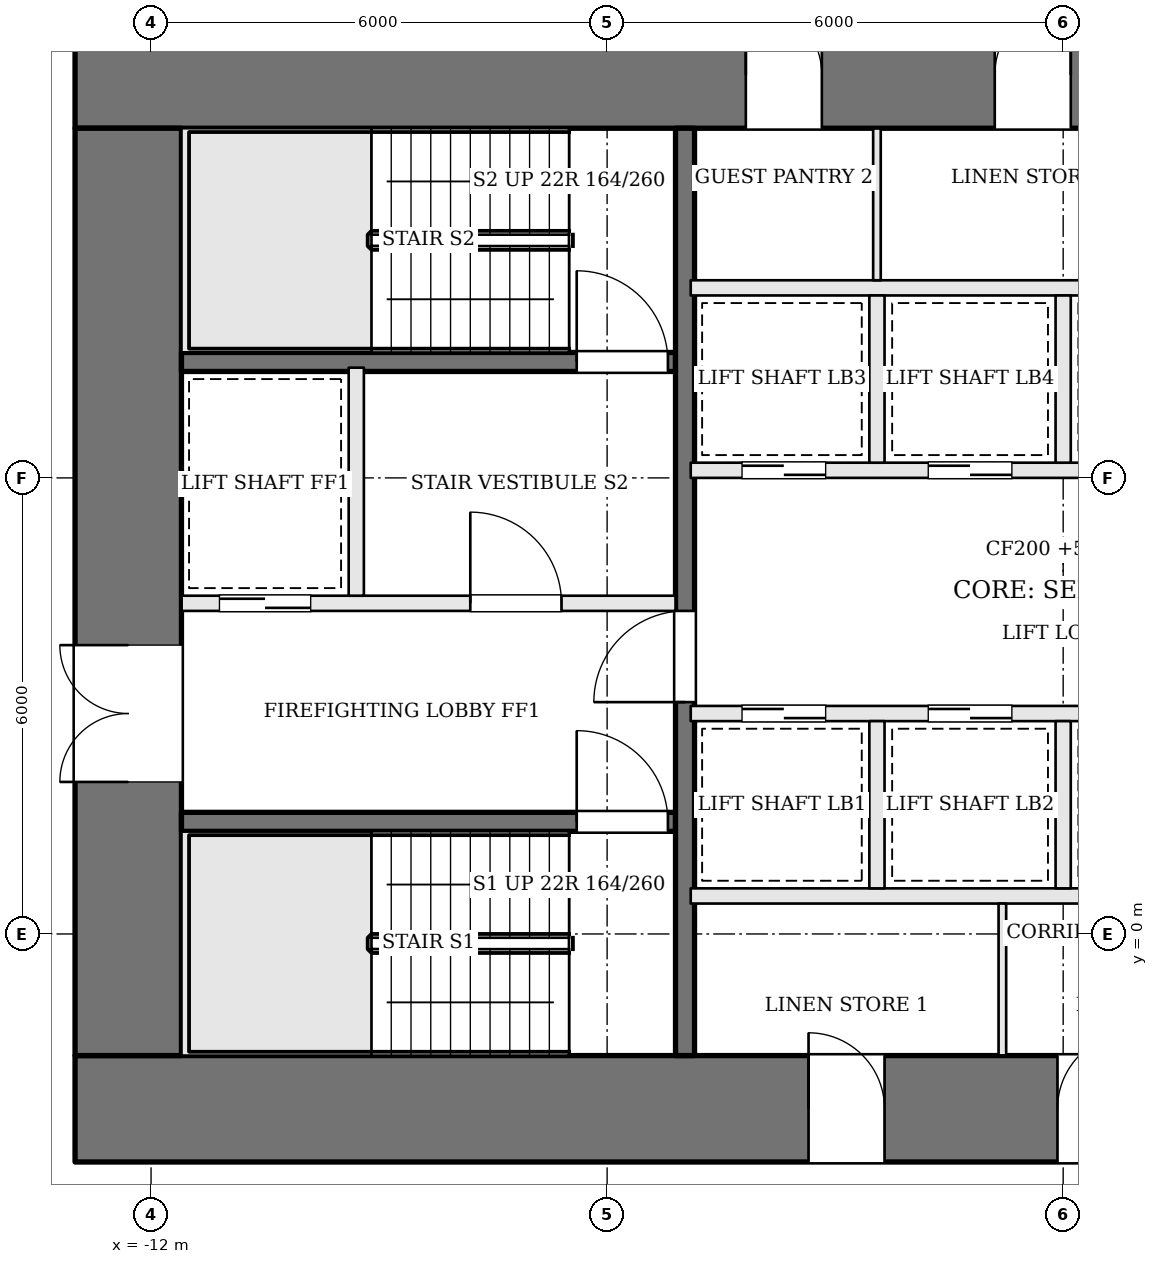
"""IFC4 building model, lengths in metres.
Left out: names, types, materials, properties, quantities, classifications, styles, units other than length and angle.
Written with IfcOpenShell. Run it as: python <this file> out.ifc"""

import sys

from ifc_helpers import new_model, si_unit, direction, frame, frame_2d, origin, place, context, subcontext, project, spatial, rectangle, extrude, element, fill, save


model = new_model("IFC4")
c1 = context("Model", 3, precision=1e-05, world=origin(), true_north=direction((0.0, 1.0)))
c2 = subcontext(c1, "Body", "Model", "MODEL_VIEW")
j1 = project(units=[si_unit("LENGTHUNIT", "METRE"), si_unit("PLANEANGLEUNIT", "RADIAN")], contexts=[c1])
p1 = place(None, origin())
s1 = spatial("IfcSite", under=j1, at=p1, CompositionType="ELEMENT")
p2 = place(p1, origin())
s2 = spatial("IfcBuilding", under=s1, at=p2, CompositionType="ELEMENT")
p3 = place(p2, frame((0.0, 0.0, 59.1)))
s3 = spatial("IfcBuildingStorey", under=s2, at=p3, CompositionType="ELEMENT", Elevation=59.1)
p4 = place(p3, frame((-13.0, 11.3, 0.0), z_axis=(0.0, 0.0, 1.0), x_axis=(1.0, 0.0, 0.0)))
e1 = element("IfcWall", 1, at=p4, inside=s3, PredefinedType="SHEAR", context=c2, shape_type="SweptSolid", body=[
    extrude(rectangle(XDim=26.0, YDim=1.4, at=frame_2d((13.0, 0.0))), origin(), (0.0, 0.0, 1.0), 3.6),
])
p5 = place(p4, frame((8.825, 0.0, 0.0)))
e2 = element("IfcOpeningElement", 2, at=p5, cuts=e1, PredefinedType="OPENING", context=c2, shape_type="SweptSolid", body=[
    extrude(rectangle(XDim=1.0, YDim=2.1, at=frame_2d((0.5, 1.05))), frame((0.0, 0.71, 0.0), z_axis=(0.0, -1.0, 0.0), x_axis=(1.0, 0.0, 0.0)), (0.0, 0.0, 1.0), 1.42),
])
p6 = place(p4, frame((12.1, 0.0, 0.0)))
e3 = element("IfcOpeningElement", 3, at=p6, cuts=e1, PredefinedType="OPENING", context=c2, shape_type="SweptSolid", body=[
    extrude(rectangle(XDim=1.0, YDim=2.1, at=frame_2d((0.5, 1.05))), frame((0.0, 0.71, 0.0), z_axis=(0.0, -1.0, 0.0), x_axis=(1.0, 0.0, 0.0)), (0.0, 0.0, 1.0), 1.42),
])
p7 = place(p4, frame((15.125, 0.0, 0.0)))
e4 = element("IfcOpeningElement", 4, at=p7, cuts=e1, PredefinedType="OPENING", context=c2, shape_type="SweptSolid", body=[
    extrude(rectangle(XDim=0.7, YDim=2.1, at=frame_2d((0.35, 1.05))), frame((0.0, 0.71, 0.0), z_axis=(0.0, -1.0, 0.0), x_axis=(1.0, 0.0, 0.0)), (0.0, 0.0, 1.0), 1.42),
])
p8 = place(p4, frame((16.65, 0.0, 0.0)))
e5 = element("IfcOpeningElement", 5, at=p8, cuts=e1, PredefinedType="OPENING", context=c2, shape_type="SweptSolid", body=[
    extrude(rectangle(XDim=0.9, YDim=2.1, at=frame_2d((0.45, 1.05))), frame((0.0, 0.71, 0.0), z_axis=(0.0, -1.0, 0.0), x_axis=(1.0, 0.0, 0.0)), (0.0, 0.0, 1.0), 1.42),
])
p9 = place(p3, frame((-13.0, -2.3, 0.0), z_axis=(0.0, 0.0, 1.0), x_axis=(1.0, 0.0, 0.0)))
e6 = element("IfcWall", 6, at=p9, inside=s3, PredefinedType="SHEAR", context=c2, shape_type="SweptSolid", body=[
    extrude(rectangle(XDim=26.0, YDim=1.4, at=frame_2d((13.0, 0.0))), origin(), (0.0, 0.0, 1.0), 3.6),
])
p10 = place(p9, frame((9.65, 0.0, 0.0)))
e7 = element("IfcOpeningElement", 7, at=p10, cuts=e6, PredefinedType="OPENING", context=c2, shape_type="SweptSolid", body=[
    extrude(rectangle(XDim=1.0, YDim=2.1, at=frame_2d((0.5, 1.05))), frame((0.0, 0.71, 0.0), z_axis=(0.0, -1.0, 0.0), x_axis=(1.0, 0.0, 0.0)), (0.0, 0.0, 1.0), 1.42),
])
p11 = place(p9, frame((12.925, 0.0, 0.0)))
e8 = element("IfcOpeningElement", 8, at=p11, cuts=e6, PredefinedType="OPENING", context=c2, shape_type="SweptSolid", body=[
    extrude(rectangle(XDim=1.0, YDim=2.1, at=frame_2d((0.5, 1.05))), frame((0.0, 0.71, 0.0), z_axis=(0.0, -1.0, 0.0), x_axis=(1.0, 0.0, 0.0)), (0.0, 0.0, 1.0), 1.42),
])
p12 = place(p9, frame((15.125, 0.0, 0.0)))
e9 = element("IfcOpeningElement", 9, at=p12, cuts=e6, PredefinedType="OPENING", context=c2, shape_type="SweptSolid", body=[
    extrude(rectangle(XDim=0.7, YDim=2.1, at=frame_2d((0.35, 1.05))), frame((0.0, 0.71, 0.0), z_axis=(0.0, -1.0, 0.0), x_axis=(1.0, 0.0, 0.0)), (0.0, 0.0, 1.0), 1.42),
])
p13 = place(p9, frame((16.5, 0.0, 0.0)))
e10 = element("IfcOpeningElement", 10, at=p13, cuts=e6, PredefinedType="OPENING", context=c2, shape_type="SweptSolid", body=[
    extrude(rectangle(XDim=1.0, YDim=2.1, at=frame_2d((0.5, 1.05))), frame((0.0, 0.71, 0.0), z_axis=(0.0, -1.0, 0.0), x_axis=(1.0, 0.0, 0.0)), (0.0, 0.0, 1.0), 1.42),
])
p14 = place(p3, frame((-12.3, -1.6, 0.0), z_axis=(0.0, 0.0, 1.0), x_axis=(0.0, 1.0, 0.0)))
e11 = element("IfcWall", 11, at=p14, inside=s3, PredefinedType="SHEAR", context=c2, shape_type="SweptSolid", body=[
    extrude(rectangle(XDim=12.2, YDim=1.4, at=frame_2d((6.1, 0.0))), origin(), (0.0, 0.0, 1.0), 3.6),
])
p15 = place(p14, frame((3.6, 0.0, 0.0)))
e12 = element("IfcOpeningElement", 12, at=p15, cuts=e11, PredefinedType="OPENING", context=c2, shape_type="SweptSolid", body=[
    extrude(rectangle(XDim=1.8, YDim=2.1, at=frame_2d((0.9, 1.05))), frame((0.0, 0.71, 0.0), z_axis=(0.0, -1.0, 0.0), x_axis=(1.0, 0.0, 0.0)), (0.0, 0.0, 1.0), 1.42),
])
p16 = place(p3, frame((-11.6, 1.475, 0.0), z_axis=(0.0, 0.0, 1.0), x_axis=(1.0, 0.0, 0.0)))
e13 = element("IfcWall", 13, at=p16, inside=s3, PredefinedType="SOLIDWALL", context=c2, shape_type="SweptSolid", body=[
    extrude(rectangle(XDim=6.5, YDim=0.25, at=frame_2d((3.25, 0.0))), origin(), (0.0, 0.0, 1.0), 3.4),
])
p17 = place(p16, frame((5.2, 0.0, 0.0)))
e14 = element("IfcOpeningElement", 14, at=p17, cuts=e13, PredefinedType="OPENING", context=c2, shape_type="SweptSolid", body=[
    extrude(rectangle(XDim=1.2, YDim=2.1, at=frame_2d((0.6, 1.05))), frame((0.0, 0.135, 0.0), z_axis=(0.0, -1.0, 0.0), x_axis=(1.0, 0.0, 0.0)), (0.0, 0.0, 1.0), 0.27),
])
p18 = place(p3, frame((-11.6, 4.35, 0.0), z_axis=(0.0, 0.0, 1.0), x_axis=(1.0, 0.0, 0.0)))
e15 = element("IfcWall", 15, at=p18, inside=s3, PredefinedType="SOLIDWALL", context=c2, shape_type="SweptSolid", body=[
    extrude(rectangle(XDim=6.5, YDim=0.2, at=frame_2d((3.25, 0.0))), origin(), (0.0, 0.0, 1.0), 3.4),
])
p19 = place(p18, frame((3.8, 0.0, 0.0)))
e16 = element("IfcOpeningElement", 16, at=p19, cuts=e15, PredefinedType="OPENING", context=c2, shape_type="SweptSolid", body=[
    extrude(rectangle(XDim=1.2, YDim=2.1, at=frame_2d((0.6, 1.05))), frame((0.0, 0.11, 0.0), z_axis=(0.0, -1.0, 0.0), x_axis=(1.0, 0.0, 0.0)), (0.0, 0.0, 1.0), 0.22),
])
p20 = place(p18, frame((0.5, 0.0, 0.0)))
e17 = element("IfcOpeningElement", 17, at=p20, cuts=e15, PredefinedType="OPENING", context=c2, shape_type="SweptSolid", body=[
    extrude(rectangle(XDim=1.2, YDim=2.1, at=frame_2d((0.6, 1.05))), frame((0.0, 0.11, 0.0), z_axis=(0.0, -1.0, 0.0), x_axis=(1.0, 0.0, 0.0)), (0.0, 0.0, 1.0), 0.22),
])
p21 = place(p3, frame((-11.6, 7.525, 0.0), z_axis=(0.0, 0.0, 1.0), x_axis=(1.0, 0.0, 0.0)))
e18 = element("IfcWall", 18, at=p21, inside=s3, PredefinedType="SOLIDWALL", context=c2, shape_type="SweptSolid", body=[
    extrude(rectangle(XDim=6.5, YDim=0.25, at=frame_2d((3.25, 0.0))), origin(), (0.0, 0.0, 1.0), 3.4),
])
p22 = place(p21, frame((5.2, 0.0, 0.0)))
e19 = element("IfcOpeningElement", 19, at=p22, cuts=e18, PredefinedType="OPENING", context=c2, shape_type="SweptSolid", body=[
    extrude(rectangle(XDim=1.2, YDim=2.1, at=frame_2d((0.6, 1.05))), frame((0.0, 0.135, 0.0), z_axis=(0.0, -1.0, 0.0), x_axis=(1.0, 0.0, 0.0)), (0.0, 0.0, 1.0), 0.27),
])
p23 = place(p3, frame((-9.3, 4.45, 0.0), z_axis=(0.0, 0.0, 1.0), x_axis=(0.0, 1.0, 0.0)))
e20 = element("IfcWall", 20, at=p23, inside=s3, PredefinedType="SOLIDWALL", context=c2, shape_type="SweptSolid", body=[
    extrude(rectangle(XDim=3.0, YDim=0.2, at=frame_2d((1.5, 0.0))), origin(), (0.0, 0.0, 1.0), 3.4),
])
p24 = place(p3, frame((-4.975, -1.6, 0.0), z_axis=(0.0, 0.0, 1.0), x_axis=(0.0, 1.0, 0.0)))
e21 = element("IfcWall", 21, at=p24, inside=s3, PredefinedType="SOLIDWALL", context=c2, shape_type="SweptSolid", body=[
    extrude(rectangle(XDim=12.2, YDim=0.25, at=frame_2d((6.1, 0.0))), origin(), (0.0, 0.0, 1.0), 3.4),
])
p25 = place(p24, frame((4.65, 0.0, 0.0)))
e22 = element("IfcOpeningElement", 22, at=p25, cuts=e21, PredefinedType="OPENING", context=c2, shape_type="SweptSolid", body=[
    extrude(rectangle(XDim=1.2, YDim=2.1, at=frame_2d((0.6, 1.05))), frame((0.0, 0.135, 0.0), z_axis=(0.0, -1.0, 0.0), x_axis=(1.0, 0.0, 0.0)), (0.0, 0.0, 1.0), 0.27),
])
p26 = place(p3, frame((-4.9, 0.5, 0.0), z_axis=(0.0, 0.0, 1.0), x_axis=(1.0, 0.0, 0.0)))
e23 = element("IfcWall", 23, at=p26, inside=s3, PredefinedType="SOLIDWALL", context=c2, shape_type="SweptSolid", body=[
    extrude(rectangle(XDim=9.8, YDim=0.2, at=frame_2d((4.9, 0.0))), origin(), (0.0, 0.0, 1.0), 3.4),
])
p27 = place(p3, frame((-4.9, 2.9, 0.0), z_axis=(0.0, 0.0, 1.0), x_axis=(1.0, 0.0, 0.0)))
e24 = element("IfcWall", 24, at=p27, inside=s3, PredefinedType="SOLIDWALL", context=c2, shape_type="SweptSolid", body=[
    extrude(rectangle(XDim=9.8, YDim=0.2, at=frame_2d((4.9, 0.0))), origin(), (0.0, 0.0, 1.0), 3.4),
])
p28 = place(p27, frame((0.675, 0.0, 0.0)))
e25 = element("IfcOpeningElement", 25, at=p28, cuts=e24, PredefinedType="OPENING", context=c2, shape_type="SweptSolid", body=[
    extrude(rectangle(XDim=1.1, YDim=2.1, at=frame_2d((0.55, 1.05))), frame((0.0, 0.11, 0.0), z_axis=(0.0, -1.0, 0.0), x_axis=(1.0, 0.0, 0.0)), (0.0, 0.0, 1.0), 0.22),
])
p29 = place(p27, frame((3.125, 0.0, 0.0)))
e26 = element("IfcOpeningElement", 26, at=p29, cuts=e24, PredefinedType="OPENING", context=c2, shape_type="SweptSolid", body=[
    extrude(rectangle(XDim=1.1, YDim=2.1, at=frame_2d((0.55, 1.05))), frame((0.0, 0.11, 0.0), z_axis=(0.0, -1.0, 0.0), x_axis=(1.0, 0.0, 0.0)), (0.0, 0.0, 1.0), 0.22),
])
p30 = place(p3, frame((-4.9, 6.1, 0.0), z_axis=(0.0, 0.0, 1.0), x_axis=(1.0, 0.0, 0.0)))
e27 = element("IfcWall", 27, at=p30, inside=s3, PredefinedType="SOLIDWALL", context=c2, shape_type="SweptSolid", body=[
    extrude(rectangle(XDim=9.8, YDim=0.2, at=frame_2d((4.9, 0.0))), origin(), (0.0, 0.0, 1.0), 3.4),
])
p31 = place(p30, frame((0.675, 0.0, 0.0)))
e28 = element("IfcOpeningElement", 28, at=p31, cuts=e27, PredefinedType="OPENING", context=c2, shape_type="SweptSolid", body=[
    extrude(rectangle(XDim=1.1, YDim=2.1, at=frame_2d((0.55, 1.05))), frame((0.0, 0.11, 0.0), z_axis=(0.0, -1.0, 0.0), x_axis=(1.0, 0.0, 0.0)), (0.0, 0.0, 1.0), 0.22),
])
p32 = place(p30, frame((3.125, 0.0, 0.0)))
e29 = element("IfcOpeningElement", 29, at=p32, cuts=e27, PredefinedType="OPENING", context=c2, shape_type="SweptSolid", body=[
    extrude(rectangle(XDim=1.1, YDim=2.1, at=frame_2d((0.55, 1.05))), frame((0.0, 0.11, 0.0), z_axis=(0.0, -1.0, 0.0), x_axis=(1.0, 0.0, 0.0)), (0.0, 0.0, 1.0), 0.22),
])
p33 = place(p30, frame((5.575, 0.0, 0.0)))
e30 = element("IfcOpeningElement", 30, at=p33, cuts=e27, PredefinedType="OPENING", context=c2, shape_type="SweptSolid", body=[
    extrude(rectangle(XDim=1.1, YDim=2.1, at=frame_2d((0.55, 1.05))), frame((0.0, 0.11, 0.0), z_axis=(0.0, -1.0, 0.0), x_axis=(1.0, 0.0, 0.0)), (0.0, 0.0, 1.0), 0.22),
])
p34 = place(p30, frame((8.025, 0.0, 0.0)))
e31 = element("IfcOpeningElement", 31, at=p34, cuts=e27, PredefinedType="OPENING", context=c2, shape_type="SweptSolid", body=[
    extrude(rectangle(XDim=1.1, YDim=2.1, at=frame_2d((0.55, 1.05))), frame((0.0, 0.11, 0.0), z_axis=(0.0, -1.0, 0.0), x_axis=(1.0, 0.0, 0.0)), (0.0, 0.0, 1.0), 0.22),
])
p35 = place(p3, frame((-4.9, 8.5, 0.0), z_axis=(0.0, 0.0, 1.0), x_axis=(1.0, 0.0, 0.0)))
e32 = element("IfcWall", 32, at=p35, inside=s3, PredefinedType="SOLIDWALL", context=c2, shape_type="SweptSolid", body=[
    extrude(rectangle(XDim=9.8, YDim=0.2, at=frame_2d((4.9, 0.0))), origin(), (0.0, 0.0, 1.0), 3.4),
])
for number, where, z_axis, x_axis in (
    (33, (-2.45, 0.6, 0.0), (0.0, 0.0, 1.0), (0.0, 1.0, 0.0)),
    (34, (0.0, 0.6, 0.0), (0.0, 0.0, 1.0), (0.0, 1.0, 0.0)),
    (35, (-2.45, 6.2, 0.0), (0.0, 0.0, 1.0), (0.0, 1.0, 0.0)),
    (36, (0.0, 6.2, 0.0), (0.0, 0.0, 1.0), (0.0, 1.0, 0.0)),
):
    element("IfcWall", number, at=place(p3, frame(where, z_axis=z_axis, x_axis=x_axis)), inside=s3, PredefinedType="SOLIDWALL", context=c2, shape_type="SweptSolid", body=[
        extrude(rectangle(XDim=2.2, YDim=0.2, at=frame_2d((1.1, 0.0))), origin(), (0.0, 0.0, 1.0), 3.4),
    ])
for number, where, z_axis, x_axis in (
    (37, (-0.8, -1.6, 0.0), (0.0, 0.0, 1.0), (0.0, 1.0, 0.0)),
    (38, (-2.45, 8.6, 0.0), (0.0, 0.0, 1.0), (0.0, 1.0, 0.0)),
):
    element("IfcWall", number, at=place(p3, frame(where, z_axis=z_axis, x_axis=x_axis)), inside=s3, PredefinedType="PARTITIONING", context=c2, shape_type="SweptSolid", body=[
        extrude(rectangle(XDim=2.0, YDim=0.1, at=frame_2d((1.0, 0.0))), origin(), (0.0, 0.0, 1.0), 3.4),
    ])
p36 = place(p15, origin())
e39 = element("IfcDoor", 39, at=p36, inside=s3, OperationType="DOUBLE_DOOR_SINGLE_SWING", PredefinedType="DOOR", context=c2, shape_type="SweptSolid", body=[
    extrude(rectangle(XDim=1.8, YDim=2.1, at=frame_2d((0.9, 1.05))), frame((0.0, 0.025, 0.0), z_axis=(0.0, -1.0, 0.0), x_axis=(1.0, 0.0, 0.0)), (0.0, 0.0, 1.0), 0.05),
])
fill(e12, e39)
p37 = place(p25, origin())
e40 = element("IfcDoor", 40, at=p37, inside=s3, OperationType="SINGLE_SWING_LEFT", PredefinedType="DOOR", context=c2, shape_type="SweptSolid", body=[
    extrude(rectangle(XDim=1.2, YDim=2.1, at=frame_2d((0.6, 1.05))), frame((0.0, 0.025, 0.0), z_axis=(0.0, -1.0, 0.0), x_axis=(1.0, 0.0, 0.0)), (0.0, 0.0, 1.0), 0.05),
])
fill(e22, e40)
p38 = place(p19, origin())
e41 = element("IfcDoor", 41, at=p38, inside=s3, OperationType="SINGLE_SWING_LEFT", PredefinedType="DOOR", context=c2, shape_type="SweptSolid", body=[
    extrude(rectangle(XDim=1.2, YDim=2.1, at=frame_2d((0.6, 1.05))), frame((0.0, 0.025, 0.0), z_axis=(0.0, -1.0, 0.0), x_axis=(1.0, 0.0, 0.0)), (0.0, 0.0, 1.0), 0.05),
])
fill(e16, e41)
p39 = place(p17, origin())
e42 = element("IfcDoor", 42, at=p39, inside=s3, OperationType="SINGLE_SWING_LEFT", PredefinedType="DOOR", context=c2, shape_type="SweptSolid", body=[
    extrude(rectangle(XDim=1.2, YDim=2.1, at=frame_2d((0.6, 1.05))), frame((0.0, 0.025, 0.0), z_axis=(0.0, -1.0, 0.0), x_axis=(1.0, 0.0, 0.0)), (0.0, 0.0, 1.0), 0.05),
])
fill(e14, e42)
p40 = place(p22, origin())
e43 = element("IfcDoor", 43, at=p40, inside=s3, OperationType="SINGLE_SWING_LEFT", PredefinedType="DOOR", context=c2, shape_type="SweptSolid", body=[
    extrude(rectangle(XDim=1.2, YDim=2.1, at=frame_2d((0.6, 1.05))), frame((0.0, 0.025, 0.0), z_axis=(0.0, -1.0, 0.0), x_axis=(1.0, 0.0, 0.0)), (0.0, 0.0, 1.0), 0.05),
])
fill(e19, e43)
p41 = place(p20, origin())
e44 = element("IfcDoor", 44, at=p41, inside=s3, OperationType="SLIDING_TO_RIGHT", PredefinedType="DOOR", context=c2, shape_type="SweptSolid", body=[
    extrude(rectangle(XDim=1.2, YDim=2.1, at=frame_2d((0.6, 1.05))), frame((0.0, 0.025, 0.0), z_axis=(0.0, -1.0, 0.0), x_axis=(1.0, 0.0, 0.0)), (0.0, 0.0, 1.0), 0.05),
])
fill(e17, e44)
p42 = place(p28, origin())
e45 = element("IfcDoor", 45, at=p42, inside=s3, OperationType="SLIDING_TO_RIGHT", PredefinedType="DOOR", context=c2, shape_type="SweptSolid", body=[
    extrude(rectangle(XDim=1.1, YDim=2.1, at=frame_2d((0.55, 1.05))), frame((0.0, 0.025, 0.0), z_axis=(0.0, -1.0, 0.0), x_axis=(1.0, 0.0, 0.0)), (0.0, 0.0, 1.0), 0.05),
])
fill(e25, e45)
p43 = place(p29, origin())
e46 = element("IfcDoor", 46, at=p43, inside=s3, OperationType="SLIDING_TO_LEFT", PredefinedType="DOOR", context=c2, shape_type="SweptSolid", body=[
    extrude(rectangle(XDim=1.1, YDim=2.1, at=frame_2d((0.55, 1.05))), frame((0.0, 0.025, 0.0), z_axis=(0.0, -1.0, 0.0), x_axis=(1.0, 0.0, 0.0)), (0.0, 0.0, 1.0), 0.05),
])
fill(e26, e46)
p44 = place(p31, origin())
e47 = element("IfcDoor", 47, at=p44, inside=s3, OperationType="SLIDING_TO_RIGHT", PredefinedType="DOOR", context=c2, shape_type="SweptSolid", body=[
    extrude(rectangle(XDim=1.1, YDim=2.1, at=frame_2d((0.55, 1.05))), frame((0.0, 0.025, 0.0), z_axis=(0.0, -1.0, 0.0), x_axis=(1.0, 0.0, 0.0)), (0.0, 0.0, 1.0), 0.05),
])
fill(e28, e47)
p45 = place(p32, origin())
e48 = element("IfcDoor", 48, at=p45, inside=s3, OperationType="SLIDING_TO_LEFT", PredefinedType="DOOR", context=c2, shape_type="SweptSolid", body=[
    extrude(rectangle(XDim=1.1, YDim=2.1, at=frame_2d((0.55, 1.05))), frame((0.0, 0.025, 0.0), z_axis=(0.0, -1.0, 0.0), x_axis=(1.0, 0.0, 0.0)), (0.0, 0.0, 1.0), 0.05),
])
fill(e29, e48)
p46 = place(p10, origin())
e49 = element("IfcDoor", 49, at=p46, inside=s3, OperationType="SINGLE_SWING_LEFT", PredefinedType="DOOR", context=c2, shape_type="SweptSolid", body=[
    extrude(rectangle(XDim=1.0, YDim=2.1, at=frame_2d((0.5, 1.05))), frame((0.0, 0.025, 0.0), z_axis=(0.0, -1.0, 0.0), x_axis=(1.0, 0.0, 0.0)), (0.0, 0.0, 1.0), 0.05),
])
fill(e7, e49)
p47 = place(p11, origin())
e50 = element("IfcDoor", 50, at=p47, inside=s3, OperationType="SINGLE_SWING_RIGHT", PredefinedType="DOOR", context=c2, shape_type="SweptSolid", body=[
    extrude(rectangle(XDim=1.0, YDim=2.1, at=frame_2d((0.5, 1.05))), frame((0.0, 0.025, 0.0), z_axis=(0.0, -1.0, 0.0), x_axis=(1.0, 0.0, 0.0)), (0.0, 0.0, 1.0), 0.05),
])
fill(e8, e50)
p48 = place(p5, origin())
e51 = element("IfcDoor", 51, at=p48, inside=s3, OperationType="SINGLE_SWING_LEFT", PredefinedType="DOOR", context=c2, shape_type="SweptSolid", body=[
    extrude(rectangle(XDim=1.0, YDim=2.1, at=frame_2d((0.5, 1.05))), frame((0.0, 0.025, 0.0), z_axis=(0.0, -1.0, 0.0), x_axis=(1.0, 0.0, 0.0)), (0.0, 0.0, 1.0), 0.05),
])
fill(e2, e51)
p49 = place(p6, origin())
e52 = element("IfcDoor", 52, at=p49, inside=s3, OperationType="SINGLE_SWING_RIGHT", PredefinedType="DOOR", context=c2, shape_type="SweptSolid", body=[
    extrude(rectangle(XDim=1.0, YDim=2.1, at=frame_2d((0.5, 1.05))), frame((0.0, 0.025, 0.0), z_axis=(0.0, -1.0, 0.0), x_axis=(1.0, 0.0, 0.0)), (0.0, 0.0, 1.0), 0.05),
])
fill(e3, e52)
save(model, sys.argv[1])
